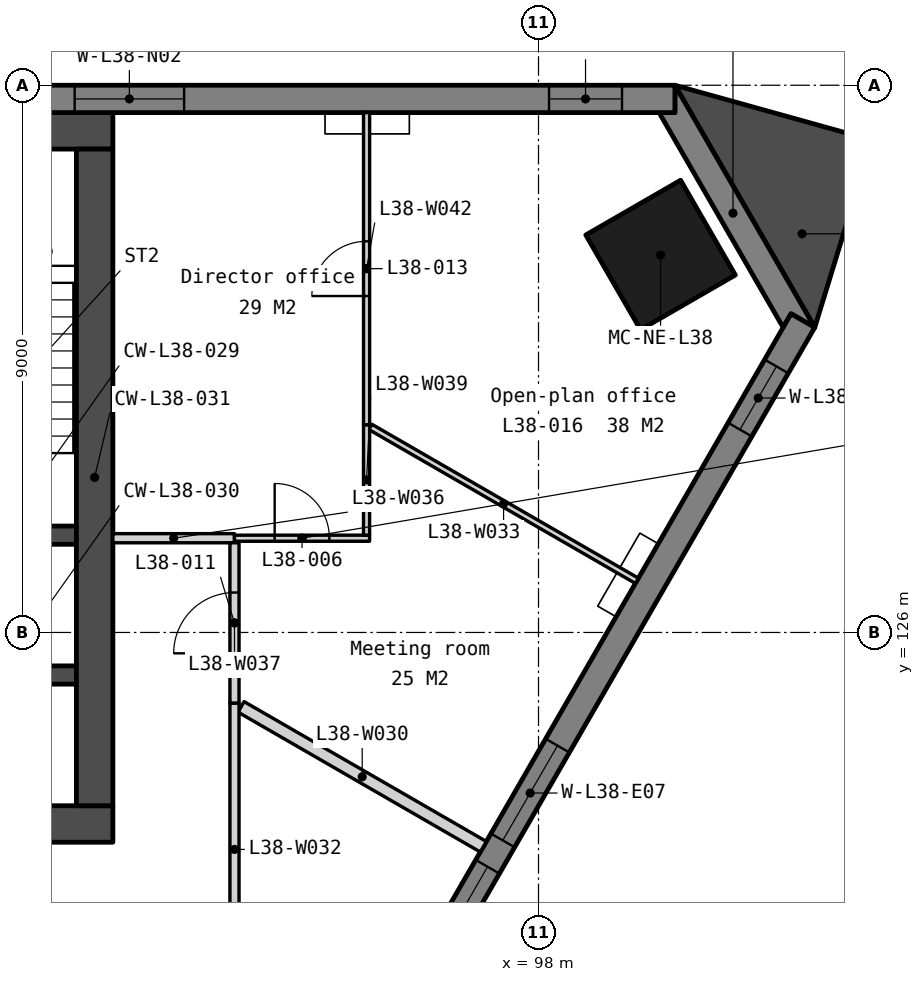
"""IFC4 building model, lengths in metres.
Left out: names, types, materials, properties, quantities, classifications, styles, units other than length and angle.
Written with IfcOpenShell. Run it as: python <this file> out.ifc"""

import sys

from ifc_helpers import new_model, si_unit, direction, frame, frame_2d, origin, origin_2d, place, context, subcontext, project, spatial, polyline, rectangle, outline, extrude, element, fill, save


model = new_model("IFC4")
c1 = context("Model", 3, precision=1e-05, world=origin(), true_north=direction((0.0, 1.0)))
c2 = subcontext(c1, "Body", "Model", "MODEL_VIEW")
j1 = project(units=[si_unit("LENGTHUNIT", "METRE"), si_unit("PLANEANGLEUNIT", "RADIAN")], contexts=[c1])
p1 = place(None, origin())
s1 = spatial("IfcSite", under=j1, at=p1, CompositionType="ELEMENT")
p2 = place(p1, origin())
s2 = spatial("IfcBuilding", under=s1, at=p2, CompositionType="ELEMENT")
p3 = place(p2, frame((0.0, 0.0, 152.0)))
s3 = spatial("IfcBuildingStorey", under=s2, at=p3, CompositionType="ELEMENT", Elevation=152.0)
p4 = place(p3, frame((100.007, 132.208, 0.0), z_axis=(0.0, 0.0, 1.0), x_axis=(-0.5, 0.866025403784, 0.0)))
e1 = element("IfcColumn", 1, at=p4, inside=s3, PredefinedType="COLUMN", context=c2, shape_type="SweptSolid", body=[
    extrude(rectangle(XDim=1.8, YDim=1.8, at=origin_2d()), origin(), (0.0, 0.0, 1.0), 3.9),
])
p5 = place(p3, frame((69.0, 134.25, 0.0), z_axis=(0.0, 0.0, 1.0), x_axis=(1.0, 0.0, 0.0)))
e2 = element("IfcWall", 2, at=p5, inside=s3, PredefinedType="SOLIDWALL", context=c2, shape_type="SweptSolid", body=[
    extrude(rectangle(XDim=22.0, YDim=0.6, at=frame_2d((11.0, 0.0))), origin(), (0.0, 0.0, 1.0), 3.75),
])
p6 = place(p3, frame((69.0, 122.85, 0.0), z_axis=(0.0, 0.0, 1.0), x_axis=(1.0, 0.0, 0.0)))
e3 = element("IfcWall", 3, at=p6, inside=s3, PredefinedType="SOLIDWALL", context=c2, shape_type="SweptSolid", body=[
    extrude(rectangle(XDim=22.0, YDim=0.6, at=frame_2d((11.0, 0.0))), origin(), (0.0, 0.0, 1.0), 3.75),
])
p7 = place(p6, frame((16.375, 0.0, 0.0)))
e4 = element("IfcOpeningElement", 4, at=p7, cuts=e3, PredefinedType="OPENING", context=c2, shape_type="SweptSolid", body=[
    extrude(rectangle(XDim=1.8, YDim=2.1, at=frame_2d((0.9, 1.05))), frame((0.0, 0.31, 0.0), z_axis=(0.0, -1.0, 0.0), x_axis=(1.0, 0.0, 0.0)), (0.0, 0.0, 1.0), 0.62),
])
p8 = place(p6, frame((3.825, 0.0, 0.0)))
e5 = element("IfcOpeningElement", 5, at=p8, cuts=e3, PredefinedType="OPENING", context=c2, shape_type="SweptSolid", body=[
    extrude(rectangle(XDim=1.8, YDim=2.1, at=frame_2d((0.9, 1.05))), frame((0.0, 0.31, 0.0), z_axis=(0.0, -1.0, 0.0), x_axis=(1.0, 0.0, 0.0)), (0.0, 0.0, 1.0), 0.62),
])
p9 = place(p6, frame((12.85, 0.0, 0.0)))
e6 = element("IfcOpeningElement", 6, at=p9, cuts=e3, PredefinedType="OPENING", context=c2, shape_type="SweptSolid", body=[
    extrude(rectangle(XDim=1.5, YDim=2.1, at=frame_2d((0.75, 1.05))), frame((0.0, 0.31, 0.0), z_axis=(0.0, -1.0, 0.0), x_axis=(1.0, 0.0, 0.0)), (0.0, 0.0, 1.0), 0.62),
])
for number, where, z_axis, x_axis in (
    (7, (87.85, 127.6, 0.0), (0.0, 0.0, 1.0), (1.0, 0.0, 0.0)),
    (8, (87.85, 125.3, 0.0), (0.0, 0.0, 1.0), (1.0, 0.0, 0.0)),
):
    element("IfcWall", number, at=place(p3, frame(where, z_axis=z_axis, x_axis=x_axis)), inside=s3, PredefinedType="SOLIDWALL", context=c2, shape_type="SweptSolid", body=[
        extrude(rectangle(XDim=2.55, YDim=0.3, at=frame_2d((1.275, 0.0))), origin(), (0.0, 0.0, 1.0), 3.75),
    ])
p10 = place(p3, frame((90.7, 133.95, 0.0), z_axis=(0.0, 0.0, 1.0), x_axis=(0.0, -1.0, 0.0)))
e9 = element("IfcWall", 9, at=p10, inside=s3, PredefinedType="SOLIDWALL", context=c2, shape_type="SweptSolid", body=[
    extrude(rectangle(XDim=10.8, YDim=0.6, at=frame_2d((5.4, 0.0))), origin(), (0.0, 0.0, 1.0), 3.75),
])
p11 = place(p3, frame((0.0, 0.0, -0.15)))
e10 = element("IfcWall", 10, at=p11, inside=s3, PredefinedType="SOLIDWALL", context=c2, shape_type="SweptSolid", body=[
    extrude(outline(polyline([(102.543, 131.016), (102.153, 131.241), (102.023, 131.016), (99.983, 134.55), (100.243, 134.55), (100.243, 135.0), (102.543, 131.016)])), origin(), (0.0, 0.0, 1.0), 3.9),
])
p12 = place(p3, frame((100.243, 134.775, -0.15), z_axis=(0.0, 0.0, 1.0), x_axis=(-1.0, 0.0, 0.0)))
e11 = element("IfcWall", 11, at=p12, inside=s3, PredefinedType="SOLIDWALL", context=c2, shape_type="SweptSolid", body=[
    extrude(outline(polyline([(40.486, 0.0), (40.486, 3.9), (0.0, 3.9), (0.0, 0.0), (40.486, 0.0)])), frame((0.0, 0.225, 0.0), z_axis=(0.0, -1.0, 0.0), x_axis=(1.0, 0.0, 0.0)), (0.0, 0.0, 1.0), 0.45),
])
p13 = place(p12, frame((0.87, 0.0, 0.95)))
e12 = element("IfcOpeningElement", 12, at=p13, cuts=e11, PredefinedType="OPENING", context=c2, shape_type="SweptSolid", body=[
    extrude(rectangle(XDim=1.2, YDim=2.2, at=frame_2d((0.6, 1.1))), frame((0.0, 0.235, 0.0), z_axis=(0.0, -1.0, 0.0), x_axis=(1.0, 0.0, 0.0)), (0.0, 0.0, 1.0), 0.47),
])
p14 = place(p12, frame((8.072, 0.0, 0.95)))
e13 = element("IfcOpeningElement", 13, at=p14, cuts=e11, PredefinedType="OPENING", context=c2, shape_type="SweptSolid", body=[
    extrude(rectangle(XDim=1.8, YDim=2.2, at=frame_2d((0.9, 1.1))), frame((0.0, 0.235, 0.0), z_axis=(0.0, -1.0, 0.0), x_axis=(1.0, 0.0, 0.0)), (0.0, 0.0, 1.0), 0.47),
])
p15 = place(p12, frame((10.372, 0.0, 0.95)))
e14 = element("IfcOpeningElement", 14, at=p15, cuts=e11, PredefinedType="OPENING", context=c2, shape_type="SweptSolid", body=[
    extrude(rectangle(XDim=1.8, YDim=2.2, at=frame_2d((0.9, 1.1))), frame((0.0, 0.235, 0.0), z_axis=(0.0, -1.0, 0.0), x_axis=(1.0, 0.0, 0.0)), (0.0, 0.0, 1.0), 0.47),
])
p16 = place(p12, frame((18.193, 0.0, 0.95)))
e15 = element("IfcOpeningElement", 15, at=p16, cuts=e11, PredefinedType="OPENING", context=c2, shape_type="SweptSolid", body=[
    extrude(rectangle(XDim=1.8, YDim=2.2, at=frame_2d((0.9, 1.1))), frame((0.0, 0.235, 0.0), z_axis=(0.0, -1.0, 0.0), x_axis=(1.0, 0.0, 0.0)), (0.0, 0.0, 1.0), 0.47),
])
p17 = place(p12, frame((20.493, 0.0, 0.95)))
e16 = element("IfcOpeningElement", 16, at=p17, cuts=e11, PredefinedType="OPENING", context=c2, shape_type="SweptSolid", body=[
    extrude(rectangle(XDim=1.8, YDim=2.2, at=frame_2d((0.9, 1.1))), frame((0.0, 0.235, 0.0), z_axis=(0.0, -1.0, 0.0), x_axis=(1.0, 0.0, 0.0)), (0.0, 0.0, 1.0), 0.47),
])
p18 = place(p12, frame((28.315, 0.0, 0.95)))
e17 = element("IfcOpeningElement", 17, at=p18, cuts=e11, PredefinedType="OPENING", context=c2, shape_type="SweptSolid", body=[
    extrude(rectangle(XDim=1.8, YDim=2.2, at=frame_2d((0.9, 1.1))), frame((0.0, 0.235, 0.0), z_axis=(0.0, -1.0, 0.0), x_axis=(1.0, 0.0, 0.0)), (0.0, 0.0, 1.0), 0.47),
])
p19 = place(p12, frame((30.615, 0.0, 0.95)))
e18 = element("IfcOpeningElement", 18, at=p19, cuts=e11, PredefinedType="OPENING", context=c2, shape_type="SweptSolid", body=[
    extrude(rectangle(XDim=1.8, YDim=2.2, at=frame_2d((0.9, 1.1))), frame((0.0, 0.235, 0.0), z_axis=(0.0, -1.0, 0.0), x_axis=(1.0, 0.0, 0.0)), (0.0, 0.0, 1.0), 0.47),
])
p20 = place(p12, frame((38.417, 0.0, 0.95)))
e19 = element("IfcOpeningElement", 19, at=p20, cuts=e11, PredefinedType="OPENING", context=c2, shape_type="SweptSolid", body=[
    extrude(rectangle(XDim=1.2, YDim=2.2, at=frame_2d((0.6, 1.1))), frame((0.0, 0.235, 0.0), z_axis=(0.0, -1.0, 0.0), x_axis=(1.0, 0.0, 0.0)), (0.0, 0.0, 1.0), 0.47),
])
p21 = place(p3, frame((82.105, 96.067, -0.15), z_axis=(0.0, 0.0, 1.0), x_axis=(0.499997369791, 0.866026922331, 0.0)))
e20 = element("IfcWall", 20, at=p21, inside=s3, PredefinedType="SOLIDWALL", context=c2, shape_type="SweptSolid", body=[
    extrude(outline(polyline([(40.486, 0.0), (40.486, 3.9), (0.0, 3.9), (0.0, 0.0), (40.486, 0.0)])), frame((0.0, 0.225, 0.0), z_axis=(0.0, -1.0, 0.0), x_axis=(1.0, 0.0, 0.0)), (0.0, 0.0, 1.0), 0.45),
])
p22 = place(p21, frame((0.87, 0.0, 0.95)))
e21 = element("IfcOpeningElement", 21, at=p22, cuts=e20, PredefinedType="OPENING", context=c2, shape_type="SweptSolid", body=[
    extrude(rectangle(XDim=1.2, YDim=2.2, at=frame_2d((0.6, 1.1))), frame((0.0, 0.235, 0.0), z_axis=(0.0, -1.0, 0.0), x_axis=(1.0, 0.0, 0.0)), (0.0, 0.0, 1.0), 0.47),
])
p23 = place(p21, frame((8.072, 0.0, 0.95)))
e22 = element("IfcOpeningElement", 22, at=p23, cuts=e20, PredefinedType="OPENING", context=c2, shape_type="SweptSolid", body=[
    extrude(rectangle(XDim=1.8, YDim=2.2, at=frame_2d((0.9, 1.1))), frame((0.0, 0.235, 0.0), z_axis=(0.0, -1.0, 0.0), x_axis=(1.0, 0.0, 0.0)), (0.0, 0.0, 1.0), 0.47),
])
p24 = place(p21, frame((10.372, 0.0, 0.95)))
e23 = element("IfcOpeningElement", 23, at=p24, cuts=e20, PredefinedType="OPENING", context=c2, shape_type="SweptSolid", body=[
    extrude(rectangle(XDim=1.8, YDim=2.2, at=frame_2d((0.9, 1.1))), frame((0.0, 0.235, 0.0), z_axis=(0.0, -1.0, 0.0), x_axis=(1.0, 0.0, 0.0)), (0.0, 0.0, 1.0), 0.47),
])
p25 = place(p21, frame((18.193, 0.0, 0.95)))
e24 = element("IfcOpeningElement", 24, at=p25, cuts=e20, PredefinedType="OPENING", context=c2, shape_type="SweptSolid", body=[
    extrude(rectangle(XDim=1.8, YDim=2.2, at=frame_2d((0.9, 1.1))), frame((0.0, 0.235, 0.0), z_axis=(0.0, -1.0, 0.0), x_axis=(1.0, 0.0, 0.0)), (0.0, 0.0, 1.0), 0.47),
])
p26 = place(p21, frame((20.493, 0.0, 0.95)))
e25 = element("IfcOpeningElement", 25, at=p26, cuts=e20, PredefinedType="OPENING", context=c2, shape_type="SweptSolid", body=[
    extrude(rectangle(XDim=1.8, YDim=2.2, at=frame_2d((0.9, 1.1))), frame((0.0, 0.235, 0.0), z_axis=(0.0, -1.0, 0.0), x_axis=(1.0, 0.0, 0.0)), (0.0, 0.0, 1.0), 0.47),
])
p27 = place(p21, frame((28.315, 0.0, 0.95)))
e26 = element("IfcOpeningElement", 26, at=p27, cuts=e20, PredefinedType="OPENING", context=c2, shape_type="SweptSolid", body=[
    extrude(rectangle(XDim=1.8, YDim=2.2, at=frame_2d((0.9, 1.1))), frame((0.0, 0.235, 0.0), z_axis=(0.0, -1.0, 0.0), x_axis=(1.0, 0.0, 0.0)), (0.0, 0.0, 1.0), 0.47),
])
p28 = place(p21, frame((30.615, 0.0, 0.95)))
e27 = element("IfcOpeningElement", 27, at=p28, cuts=e20, PredefinedType="OPENING", context=c2, shape_type="SweptSolid", body=[
    extrude(rectangle(XDim=1.8, YDim=2.2, at=frame_2d((0.9, 1.1))), frame((0.0, 0.235, 0.0), z_axis=(0.0, -1.0, 0.0), x_axis=(1.0, 0.0, 0.0)), (0.0, 0.0, 1.0), 0.47),
])
p29 = place(p21, frame((38.417, 0.0, 0.95)))
e28 = element("IfcOpeningElement", 28, at=p29, cuts=e20, PredefinedType="OPENING", context=c2, shape_type="SweptSolid", body=[
    extrude(rectangle(XDim=1.2, YDim=2.2, at=frame_2d((0.6, 1.1))), frame((0.0, 0.235, 0.0), z_axis=(0.0, -1.0, 0.0), x_axis=(1.0, 0.0, 0.0)), (0.0, 0.0, 1.0), 0.47),
])
p30 = place(p3, frame((0.0, 0.0, -0.15)))
e29 = element("IfcWall", 29, at=p30, inside=s3, PredefinedType="SOLIDWALL", context=c2, shape_type="SweptSolid", body=[
    extrude(outline(polyline([(102.543, 131.016), (103.488, 134.097), (100.243, 135.0), (102.543, 131.016)])), origin(), (0.0, 0.0, 1.0), 3.9),
])
p31 = place(p3, frame((93.108, 124.776, 0.0), z_axis=(0.0, 0.0, 1.0), x_axis=(0.866033592927, -0.499985815721, 0.0)))
e30 = element("IfcWall", 30, at=p31, inside=s3, PredefinedType="PARTITIONING", context=c2, shape_type="SweptSolid", body=[
    extrude(rectangle(XDim=4.601, YDim=0.2, at=frame_2d((2.3, 0.0))), origin(), (0.0, 0.0, 1.0), 3.75),
])
p32 = place(p3, frame((93.0, 120.025, 0.0), z_axis=(0.0, 0.0, 1.0), x_axis=(0.0, 1.0, 0.0)))
e31 = element("IfcWall", 31, at=p32, inside=s3, PredefinedType="PARTITIONING", context=c2, shape_type="SweptSolid", body=[
    extrude(rectangle(XDim=4.814, YDim=0.15, at=frame_2d((2.407, 0.0))), origin(), (0.0, 0.0, 1.0), 3.75),
])
p33 = place(p3, frame((95.233, 129.382, 0.0), z_axis=(0.0, 0.0, 1.0), x_axis=(0.866041859802, -0.499971496258, 0.0)))
e32 = element("IfcWall", 32, at=p33, inside=s3, PredefinedType="PARTITIONING", context=c2, shape_type="SweptSolid", body=[
    extrude(rectangle(XDim=5.063, YDim=0.1, at=frame_2d((2.532, 0.0))), origin(), (0.0, 0.0, 1.0), 3.75),
])
p34 = place(p3, frame((91.0, 127.55, 0.0), z_axis=(0.0, 0.0, 1.0), x_axis=(1.0, 0.0, 0.0)))
e33 = element("IfcWall", 33, at=p34, inside=s3, PredefinedType="PARTITIONING", context=c2, shape_type="SweptSolid", body=[
    extrude(rectangle(XDim=2.0, YDim=0.15, at=frame_2d((1.0, 0.0))), origin(), (0.0, 0.0, 1.0), 3.75),
])
p35 = place(p3, frame((93.0, 124.839, 0.0), z_axis=(0.0, 0.0, 1.0), x_axis=(0.0, 1.0, 0.0)))
e34 = element("IfcWall", 34, at=p35, inside=s3, PredefinedType="PARTITIONING", context=c2, shape_type="SweptSolid", body=[
    extrude(rectangle(XDim=2.636, YDim=0.15, at=frame_2d((1.318, 0.0))), origin(), (0.0, 0.0, 1.0), 3.75),
])
p36 = place(p35, frame((0.818, 0.0, 0.0)))
e35 = element("IfcOpeningElement", 35, at=p36, cuts=e34, PredefinedType="OPENING", context=c2, shape_type="SweptSolid", body=[
    extrude(rectangle(XDim=1.0, YDim=2.1, at=frame_2d((0.5, 1.05))), frame((0.0, 0.085, 0.0), z_axis=(0.0, -1.0, 0.0), x_axis=(1.0, 0.0, 0.0)), (0.0, 0.0, 1.0), 0.17),
])
p37 = place(p3, frame((93.0, 127.55, 0.0), z_axis=(0.0, 0.0, 1.0), x_axis=(1.0, 0.0, 0.0)))
e36 = element("IfcWall", 36, at=p37, inside=s3, PredefinedType="PARTITIONING", context=c2, shape_type="SweptSolid", body=[
    extrude(rectangle(XDim=2.222, YDim=0.1, at=frame_2d((1.111, 0.0))), origin(), (0.0, 0.0, 1.0), 3.75),
])
p38 = place(p37, frame((0.661, 0.0, 0.0)))
e37 = element("IfcOpeningElement", 37, at=p38, cuts=e36, PredefinedType="OPENING", context=c2, shape_type="SweptSolid", body=[
    extrude(rectangle(XDim=0.9, YDim=2.1, at=frame_2d((0.45, 1.05))), frame((0.0, 0.06, 0.0), z_axis=(0.0, -1.0, 0.0), x_axis=(1.0, 0.0, 0.0)), (0.0, 0.0, 1.0), 0.12),
])
p39 = place(p3, frame((95.172, 127.6, 0.0), z_axis=(0.0, 0.0, 1.0), x_axis=(0.000268781068, 0.999999963878, 0.0)))
e38 = element("IfcWall", 38, at=p39, inside=s3, PredefinedType="PARTITIONING", context=c2, shape_type="SweptSolid", body=[
    extrude(rectangle(XDim=1.817, YDim=0.1, at=frame_2d((0.908, 0.0))), origin(), (0.0, 0.0, 1.0), 3.75),
])
p40 = place(p3, frame((95.172, 129.417, 0.0), z_axis=(0.0, 0.0, 1.0), x_axis=(0.0, 1.0, 0.0)))
e39 = element("IfcWall", 39, at=p40, inside=s3, PredefinedType="PARTITIONING", context=c2, shape_type="SweptSolid", body=[
    extrude(rectangle(XDim=5.133, YDim=0.1, at=frame_2d((2.567, 0.0))), origin(), (0.0, 0.0, 1.0), 3.75),
])
p41 = place(p40, frame((2.117, 0.0, 0.0)))
e40 = element("IfcOpeningElement", 40, at=p41, cuts=e39, PredefinedType="OPENING", context=c2, shape_type="SweptSolid", body=[
    extrude(rectangle(XDim=0.9, YDim=2.1, at=frame_2d((0.45, 1.05))), frame((0.0, 0.06, 0.0), z_axis=(0.0, -1.0, 0.0), x_axis=(1.0, 0.0, 0.0)), (0.0, 0.0, 1.0), 0.12),
])
p42 = place(p13, origin())
e41 = element("IfcWindow", 41, at=p42, inside=s3, PartitioningType="SINGLE_PANEL", PredefinedType="WINDOW", context=c2, shape_type="SweptSolid", body=[
    extrude(rectangle(XDim=1.2, YDim=2.2, at=frame_2d((0.6, 1.1))), frame((0.0, 0.03, 0.0), z_axis=(0.0, -1.0, 0.0), x_axis=(1.0, 0.0, 0.0)), (0.0, 0.0, 1.0), 0.06),
])
fill(e12, e41)
p43 = place(p14, origin())
e42 = element("IfcWindow", 42, at=p43, inside=s3, PartitioningType="SINGLE_PANEL", PredefinedType="WINDOW", context=c2, shape_type="SweptSolid", body=[
    extrude(rectangle(XDim=1.8, YDim=2.2, at=frame_2d((0.9, 1.1))), frame((0.0, 0.03, 0.0), z_axis=(0.0, -1.0, 0.0), x_axis=(1.0, 0.0, 0.0)), (0.0, 0.0, 1.0), 0.06),
])
fill(e13, e42)
p44 = place(p27, origin())
e43 = element("IfcWindow", 43, at=p44, inside=s3, PartitioningType="SINGLE_PANEL", PredefinedType="WINDOW", context=c2, shape_type="SweptSolid", body=[
    extrude(rectangle(XDim=1.8, YDim=2.2, at=frame_2d((0.9, 1.1))), frame((0.0, 0.03, 0.0), z_axis=(0.0, -1.0, 0.0), x_axis=(1.0, 0.0, 0.0)), (0.0, 0.0, 1.0), 0.06),
])
fill(e26, e43)
p45 = place(p28, origin())
e44 = element("IfcWindow", 44, at=p45, inside=s3, PartitioningType="SINGLE_PANEL", PredefinedType="WINDOW", context=c2, shape_type="SweptSolid", body=[
    extrude(rectangle(XDim=1.8, YDim=2.2, at=frame_2d((0.9, 1.1))), frame((0.0, 0.03, 0.0), z_axis=(0.0, -1.0, 0.0), x_axis=(1.0, 0.0, 0.0)), (0.0, 0.0, 1.0), 0.06),
])
fill(e27, e44)
p46 = place(p29, origin())
e45 = element("IfcWindow", 45, at=p46, inside=s3, PartitioningType="SINGLE_PANEL", PredefinedType="WINDOW", context=c2, shape_type="SweptSolid", body=[
    extrude(rectangle(XDim=1.2, YDim=2.2, at=frame_2d((0.6, 1.1))), frame((0.0, 0.03, 0.0), z_axis=(0.0, -1.0, 0.0), x_axis=(1.0, 0.0, 0.0)), (0.0, 0.0, 1.0), 0.06),
])
fill(e28, e45)
p47 = place(p38, origin())
e46 = element("IfcDoor", 46, at=p47, inside=s3, OperationType="SINGLE_SWING_LEFT", PredefinedType="DOOR", context=c2, shape_type="SweptSolid", body=[
    extrude(rectangle(XDim=0.9, YDim=2.1, at=frame_2d((0.45, 1.05))), frame((0.0, 0.025, 0.0), z_axis=(0.0, -1.0, 0.0), x_axis=(1.0, 0.0, 0.0)), (0.0, 0.0, 1.0), 0.05),
])
fill(e37, e46)
p48 = place(p36, origin())
e47 = element("IfcDoor", 47, at=p48, inside=s3, OperationType="SINGLE_SWING_LEFT", PredefinedType="DOOR", context=c2, shape_type="SweptSolid", body=[
    extrude(rectangle(XDim=1.0, YDim=2.1, at=frame_2d((0.5, 1.05))), frame((0.0, 0.025, 0.0), z_axis=(0.0, -1.0, 0.0), x_axis=(1.0, 0.0, 0.0)), (0.0, 0.0, 1.0), 0.05),
])
fill(e35, e47)
p49 = place(p41, origin())
e48 = element("IfcDoor", 48, at=p49, inside=s3, OperationType="SINGLE_SWING_LEFT", PredefinedType="DOOR", context=c2, shape_type="SweptSolid", body=[
    extrude(rectangle(XDim=0.9, YDim=2.1, at=frame_2d((0.45, 1.05))), frame((0.0, 0.025, 0.0), z_axis=(0.0, -1.0, 0.0), x_axis=(1.0, 0.0, 0.0)), (0.0, 0.0, 1.0), 0.05),
])
fill(e40, e48)
save(model, sys.argv[1])
